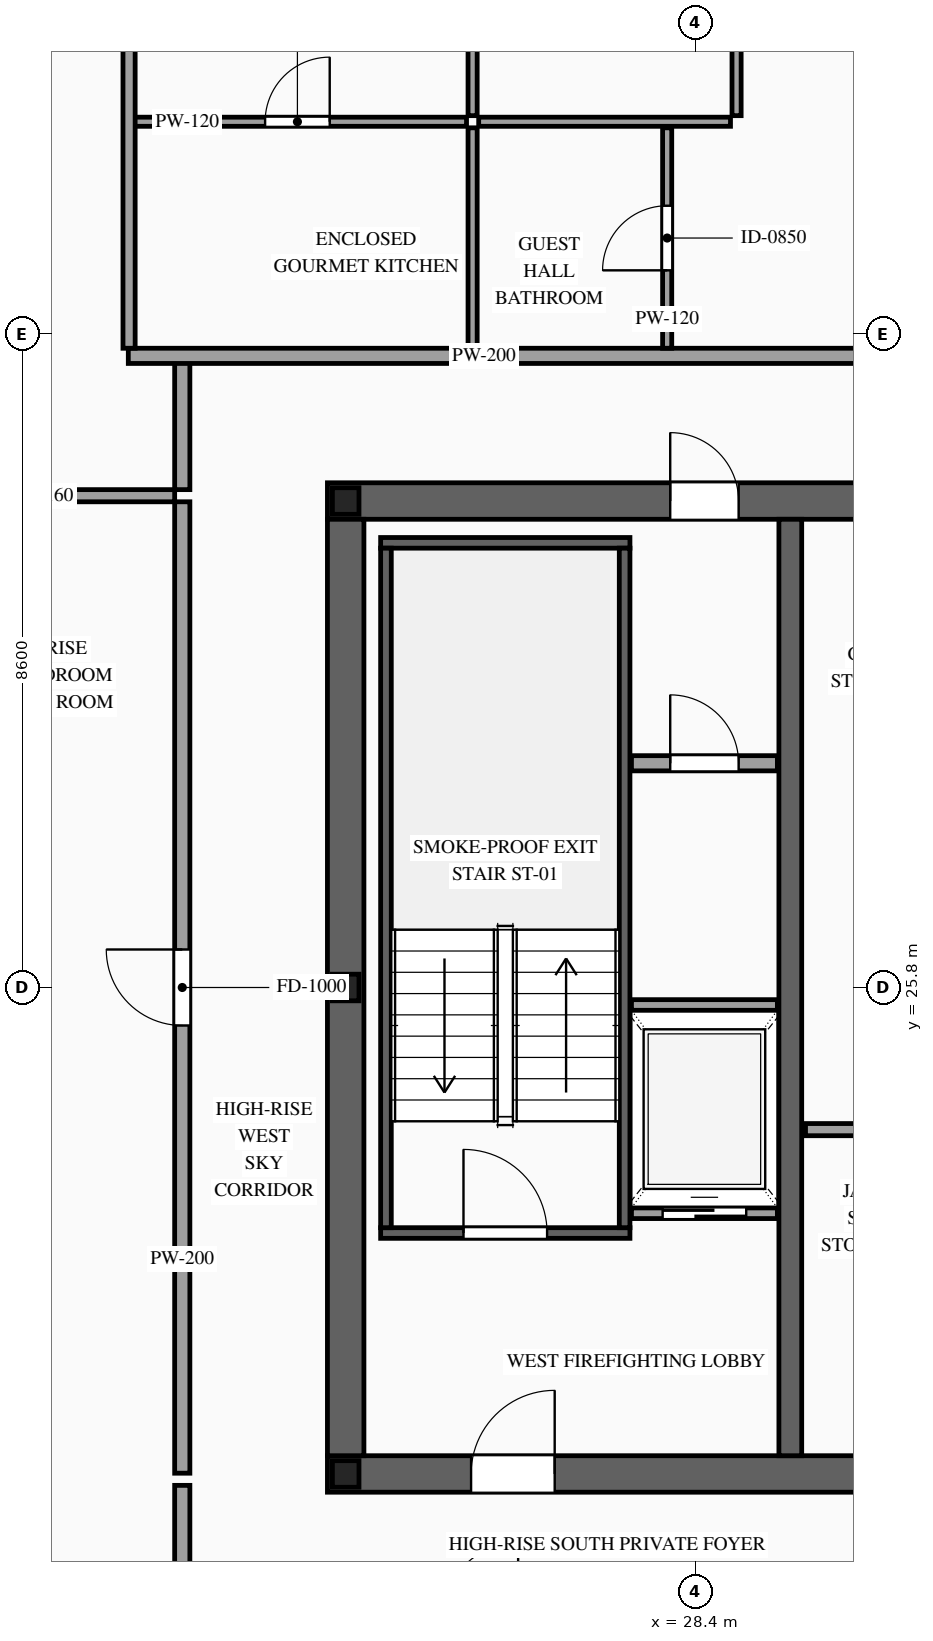
"""IFC4 building model, lengths in metres.
Left out: names, types, materials, properties, quantities, classifications, styles, units other than length and angle.
Written with IfcOpenShell. Run it as: python <this file> out.ifc"""

import sys

from ifc_helpers import new_model, si_unit, direction, frame, frame_2d, origin, origin_2d, place, context, subcontext, project, spatial, rectangle, i_section, extrude, source, transform, mapped, element, fill, save


model = new_model("IFC4")
c1 = context("Model", 3, precision=1e-05, world=origin(), true_north=direction((0.0, 1.0)))
c2 = subcontext(c1, "Body", "Model", "MODEL_VIEW")
j1 = project(units=[si_unit("LENGTHUNIT", "METRE"), si_unit("PLANEANGLEUNIT", "RADIAN")], contexts=[c1])
p1 = place(None, origin())
s1 = spatial("IfcSite", under=j1, at=p1, CompositionType="ELEMENT")
p2 = place(p1, origin())
s2 = spatial("IfcBuilding", under=s1, at=p2, CompositionType="ELEMENT")
p3 = place(p2, frame((0.0, 0.0, 285.6)))
s3 = spatial("IfcBuildingStorey", under=s2, at=p3, CompositionType="ELEMENT", Elevation=285.6)
p4 = place(p3, frame((23.56, 19.4, 0.0), z_axis=(0.0, 0.0, 1.0), x_axis=(1.0, 0.0, 0.0)))
e1 = element("IfcWall", 1, at=p4, inside=s3, PredefinedType="SHEAR", context=c2, shape_type="SweptSolid", body=[
    extrude(rectangle(XDim=26.88, YDim=0.48, at=frame_2d((13.44, 0.0))), origin(), (0.0, 0.0, 1.0), 3.5),
])
p5 = place(p4, frame((1.89, 0.0, 0.0)))
e2 = element("IfcOpeningElement", 2, at=p5, cuts=e1, PredefinedType="OPENING", context=c2, shape_type="SweptSolid", body=[
    extrude(rectangle(XDim=1.1, YDim=2.2, at=frame_2d((0.55, 1.1))), frame((0.0, 0.255, 0.0), z_axis=(0.0, -1.0, 0.0), x_axis=(1.0, 0.0, 0.0)), (0.0, 0.0, 1.0), 0.51),
])
p6 = place(p4, frame((9.79, 0.0, 0.0)))
e3 = element("IfcOpeningElement", 3, at=p6, cuts=e1, PredefinedType="OPENING", context=c2, shape_type="SweptSolid", body=[
    extrude(rectangle(XDim=1.1, YDim=2.2, at=frame_2d((0.55, 1.1))), frame((0.0, 0.255, 0.0), z_axis=(0.0, -1.0, 0.0), x_axis=(1.0, 0.0, 0.0)), (0.0, 0.0, 1.0), 0.51),
])
p7 = place(p4, frame((22.99, 0.0, 0.0)))
e4 = element("IfcOpeningElement", 4, at=p7, cuts=e1, PredefinedType="OPENING", context=c2, shape_type="SweptSolid", body=[
    extrude(rectangle(XDim=1.1, YDim=2.2, at=frame_2d((0.55, 1.1))), frame((0.0, 0.255, 0.0), z_axis=(0.0, -1.0, 0.0), x_axis=(1.0, 0.0, 0.0)), (0.0, 0.0, 1.0), 0.51),
])
p8 = place(p4, frame((19.61, 0.0, 0.0)))
e5 = element("IfcOpeningElement", 5, at=p8, cuts=e1, PredefinedType="OPENING", context=c2, shape_type="SweptSolid", body=[
    extrude(rectangle(XDim=0.9, YDim=2.15, at=frame_2d((0.45, 1.075))), frame((0.0, 0.255, 0.0), z_axis=(0.0, -1.0, 0.0), x_axis=(1.0, 0.0, 0.0)), (0.0, 0.0, 1.0), 0.51),
])
p9 = place(p4, frame((18.17, 0.0, 0.0)))
e6 = element("IfcOpeningElement", 6, at=p9, cuts=e1, PredefinedType="OPENING", context=c2, shape_type="SweptSolid", body=[
    extrude(rectangle(XDim=0.9, YDim=2.15, at=frame_2d((0.45, 1.075))), frame((0.0, 0.255, 0.0), z_axis=(0.0, -1.0, 0.0), x_axis=(1.0, 0.0, 0.0)), (0.0, 0.0, 1.0), 0.51),
])
p10 = place(p3, frame((23.56, 32.2, 0.0), z_axis=(0.0, 0.0, 1.0), x_axis=(1.0, 0.0, 0.0)))
e7 = element("IfcWall", 7, at=p10, inside=s3, PredefinedType="SHEAR", context=c2, shape_type="SweptSolid", body=[
    extrude(rectangle(XDim=26.88, YDim=0.48, at=frame_2d((13.44, 0.0))), origin(), (0.0, 0.0, 1.0), 3.5),
])
p11 = place(p10, frame((4.51, 0.0, 0.0)))
e8 = element("IfcOpeningElement", 8, at=p11, cuts=e7, PredefinedType="OPENING", context=c2, shape_type="SweptSolid", body=[
    extrude(rectangle(XDim=0.9, YDim=2.15, at=frame_2d((0.45, 1.075))), frame((0.0, 0.255, 0.0), z_axis=(0.0, -1.0, 0.0), x_axis=(1.0, 0.0, 0.0)), (0.0, 0.0, 1.0), 0.51),
])
p12 = place(p10, frame((9.79, 0.0, 0.0)))
e9 = element("IfcOpeningElement", 9, at=p12, cuts=e7, PredefinedType="OPENING", context=c2, shape_type="SweptSolid", body=[
    extrude(rectangle(XDim=1.1, YDim=2.2, at=frame_2d((0.55, 1.1))), frame((0.0, 0.255, 0.0), z_axis=(0.0, -1.0, 0.0), x_axis=(1.0, 0.0, 0.0)), (0.0, 0.0, 1.0), 0.51),
])
p13 = place(p10, frame((15.64, 0.0, 0.0)))
e10 = element("IfcOpeningElement", 10, at=p13, cuts=e7, PredefinedType="OPENING", context=c2, shape_type="SweptSolid", body=[
    extrude(rectangle(XDim=1.1, YDim=2.2, at=frame_2d((0.55, 1.1))), frame((0.0, 0.255, 0.0), z_axis=(0.0, -1.0, 0.0), x_axis=(1.0, 0.0, 0.0)), (0.0, 0.0, 1.0), 0.51),
])
p14 = place(p10, frame((18.74, 0.0, 0.0)))
e11 = element("IfcOpeningElement", 11, at=p14, cuts=e7, PredefinedType="OPENING", context=c2, shape_type="SweptSolid", body=[
    extrude(rectangle(XDim=1.1, YDim=2.2, at=frame_2d((0.55, 1.1))), frame((0.0, 0.255, 0.0), z_axis=(0.0, -1.0, 0.0), x_axis=(1.0, 0.0, 0.0)), (0.0, 0.0, 1.0), 0.51),
])
m1 = source(origin(), c2, "Body", "SweptSolid", [
    extrude(rectangle(XDim=12.32, YDim=0.48, at=frame_2d((6.16, 0.0))), origin(), (0.0, 0.0, 1.0), 3.5),
])
p15 = place(p3, frame((23.8, 19.64, 0.0), z_axis=(0.0, 0.0, 1.0), x_axis=(0.0, 1.0, 0.0)))
e12 = element("IfcWall", 12, at=p15, inside=s3, PredefinedType="SHEAR", context=c2, shape_type="MappedRepresentation", body=[
    mapped(m1, transform((0.0, 0.0, 0.0), scale=1.0)),
])
m2 = source(origin(), c2, "Body", "SweptSolid", [
    extrude(rectangle(XDim=12.32, YDim=0.3, at=frame_2d((6.16, 0.0))), origin(), (0.0, 0.0, 1.0), 3.5),
])
p16 = place(p3, frame((29.65, 19.64, 0.0), z_axis=(0.0, 0.0, 1.0), x_axis=(0.0, 1.0, 0.0)))
e13 = element("IfcWall", 13, at=p16, inside=s3, PredefinedType="SOLIDWALL", context=c2, shape_type="MappedRepresentation", body=[
    mapped(m2, transform((0.0, 0.0, 0.0), scale=1.0)),
])
m3 = source(origin(), c2, "Body", "SweptSolid", [
    extrude(i_section(OverallWidth=0.35, OverallDepth=0.35, WebThickness=0.012, FlangeThickness=0.019, at=origin_2d()), origin(), (0.0, 0.0, 1.0), 3.5),
])
for number, where, z_axis, x_axis in (
    (14, (23.8, 19.4, 0.0), (0.0, 0.0, 1.0), (1.0, 0.0, 0.0)),
    (15, (23.8, 25.8, 0.0), (0.0, 0.0, 1.0), (1.0, 0.0, 0.0)),
    (16, (23.8, 32.2, 0.0), (0.0, 0.0, 1.0), (1.0, 0.0, 0.0)),
):
    element("IfcColumn", number, at=place(p3, frame(where, z_axis=z_axis, x_axis=x_axis)), inside=s3, PredefinedType="COLUMN", context=c2, shape_type="MappedRepresentation", body=[
        mapped(m3, transform((0.0, 0.0, 0.0), scale=1.0)),
    ])
p17 = place(p3, frame((27.56, 22.83, 0.0), z_axis=(0.0, 0.0, 1.0), x_axis=(1.0, 0.0, 0.0)))
e17 = element("IfcWall", 17, at=p17, inside=s3, PredefinedType="SOLIDWALL", context=c2, shape_type="SweptSolid", body=[
    extrude(rectangle(XDim=1.92, YDim=0.14, at=frame_2d((0.96, 0.0))), origin(), (0.0, 0.0, 1.0), 3.28),
])
p18 = place(p17, frame((0.41, 0.0, 0.0)))
e18 = element("IfcOpeningElement", 18, at=p18, cuts=e17, PredefinedType="OPENING", context=c2, shape_type="SweptSolid", body=[
    extrude(rectangle(XDim=1.1, YDim=2.2, at=frame_2d((0.55, 1.1))), frame((0.0, 0.085, 0.0), z_axis=(0.0, -1.0, 0.0), x_axis=(1.0, 0.0, 0.0)), (0.0, 0.0, 1.0), 0.17),
])
m4 = source(origin(), c2, "Body", "SweptSolid", [
    extrude(rectangle(XDim=1.92, YDim=0.14, at=frame_2d((0.96, 0.0))), origin(), (0.0, 0.0, 1.0), 3.28),
])
p19 = place(p3, frame((27.56, 25.57, 0.0), z_axis=(0.0, 0.0, 1.0), x_axis=(1.0, 0.0, 0.0)))
e19 = element("IfcWall", 19, at=p19, inside=s3, PredefinedType="SOLIDWALL", context=c2, shape_type="MappedRepresentation", body=[
    mapped(m4, transform((0.0, 0.0, 0.0), scale=1.0)),
])
p20 = place(p3, frame((24.26, 22.57, 0.0), z_axis=(0.0, 0.0, 1.0), x_axis=(1.0, 0.0, 0.0)))
e20 = element("IfcWall", 20, at=p20, inside=s3, PredefinedType="SOLIDWALL", context=c2, shape_type="SweptSolid", body=[
    extrude(rectangle(XDim=3.28, YDim=0.14, at=frame_2d((1.64, 0.0))), origin(), (0.0, 0.0, 1.0), 3.28),
])
p21 = place(p20, frame((1.09, 0.0, 0.0)))
e21 = element("IfcOpeningElement", 21, at=p21, cuts=e20, PredefinedType="OPENING", context=c2, shape_type="SweptSolid", body=[
    extrude(rectangle(XDim=1.1, YDim=2.2, at=frame_2d((0.55, 1.1))), frame((0.0, 0.085, 0.0), z_axis=(0.0, -1.0, 0.0), x_axis=(1.0, 0.0, 0.0)), (0.0, 0.0, 1.0), 0.17),
])
m5 = source(origin(), c2, "Body", "SweptSolid", [
    extrude(rectangle(XDim=3.28, YDim=0.14, at=frame_2d((1.64, 0.0))), origin(), (0.0, 0.0, 1.0), 3.28),
])
p22 = place(p3, frame((24.26, 31.65, 0.0), z_axis=(0.0, 0.0, 1.0), x_axis=(1.0, 0.0, 0.0)))
e22 = element("IfcWall", 22, at=p22, inside=s3, PredefinedType="SOLIDWALL", context=c2, shape_type="MappedRepresentation", body=[
    mapped(m5, transform((0.0, 0.0, 0.0), scale=1.0)),
])
m6 = source(origin(), c2, "Body", "SweptSolid", [
    extrude(rectangle(XDim=8.94, YDim=0.14, at=frame_2d((4.47, 0.0))), origin(), (0.0, 0.0, 1.0), 3.28),
])
for number, where, z_axis, x_axis in (
    (23, (24.33, 22.64, 0.0), (0.0, 0.0, 1.0), (0.0, 1.0, 0.0)),
    (24, (27.47, 22.64, 0.0), (0.0, 0.0, 1.0), (0.0, 1.0, 0.0)),
):
    element("IfcWall", number, at=place(p3, frame(where, z_axis=z_axis, x_axis=x_axis)), inside=s3, PredefinedType="SOLIDWALL", context=c2, shape_type="MappedRepresentation", body=[
        mapped(m6, transform((0.0, 0.0, 0.0), scale=1.0)),
    ])
p23 = place(p3, frame((27.56, 28.75, 0.0), z_axis=(0.0, 0.0, 1.0), x_axis=(1.0, 0.0, 0.0)))
e25 = element("IfcWall", 25, at=p23, inside=s3, PredefinedType="PARTITIONING", context=c2, shape_type="SweptSolid", body=[
    extrude(rectangle(XDim=1.92, YDim=0.2, at=frame_2d((0.96, 0.0))), origin(), (0.0, 0.0, 1.0), 3.28),
])
p24 = place(p23, frame((0.51, 0.0, 0.0)))
e26 = element("IfcOpeningElement", 26, at=p24, cuts=e25, PredefinedType="OPENING", context=c2, shape_type="SweptSolid", body=[
    extrude(rectangle(XDim=0.9, YDim=2.15, at=frame_2d((0.45, 1.075))), frame((0.0, 0.115, 0.0), z_axis=(0.0, -1.0, 0.0), x_axis=(1.0, 0.0, 0.0)), (0.0, 0.0, 1.0), 0.23),
])
m7 = source(origin(), c2, "Body", "SweptSolid", [
    extrude(rectangle(XDim=2.47, YDim=0.16, at=frame_2d((1.235, 0.0))), origin(), (0.0, 0.0, 1.0), 3.28),
])
p25 = place(p3, frame((29.85, 23.93, 0.0), z_axis=(0.0, 0.0, 1.0), x_axis=(1.0, 0.0, 0.0)))
e27 = element("IfcWall", 27, at=p25, inside=s3, PredefinedType="PARTITIONING", context=c2, shape_type="MappedRepresentation", body=[
    mapped(m7, transform((0.0, 0.0, 0.0), scale=1.0)),
])
m8 = source(origin(), c2, "Body", "SweptSolid", [
    extrude(rectangle(XDim=1.7, YDim=0.2, at=frame_2d((0.85, 0.0))), origin(), (0.0, 0.0, 1.0), 3.28),
])
for number, where, z_axis, x_axis in (
    (28, (21.65, 32.35, 0.0), (0.0, 0.0, 1.0), (0.0, 1.0, 0.0)),
    (29, (21.65, 17.55, 0.0), (0.0, 0.0, 1.0), (0.0, 1.0, 0.0)),
):
    element("IfcWall", number, at=place(p3, frame(where, z_axis=z_axis, x_axis=x_axis)), inside=s3, PredefinedType="PARTITIONING", context=c2, shape_type="MappedRepresentation", body=[
        mapped(m8, transform((0.0, 0.0, 0.0), scale=1.0)),
    ])
p26 = place(p3, frame((20.94, 34.11, 0.0), z_axis=(0.0, 0.0, 1.0), x_axis=(1.0, 0.0, 0.0)))
e30 = element("IfcWall", 30, at=p26, inside=s3, PredefinedType="PARTITIONING", context=c2, shape_type="SweptSolid", body=[
    extrude(rectangle(XDim=16.622, YDim=0.2, at=frame_2d((8.311, 0.0))), origin(), (0.0, 0.0, 1.0), 3.28),
])
p27 = place(p26, frame((9.611, 0.0, 0.0)))
e31 = element("IfcOpeningElement", 31, at=p27, cuts=e30, PredefinedType="OPENING", context=c2, shape_type="SweptSolid", body=[
    extrude(rectangle(XDim=1.0, YDim=2.2, at=frame_2d((0.5, 1.1))), frame((0.0, 0.115, 0.0), z_axis=(0.0, -1.0, 0.0), x_axis=(1.0, 0.0, 0.0)), (0.0, 0.0, 1.0), 0.23),
])
p28 = place(p3, frame((20.94, 37.19, 0.0), z_axis=(0.0, 0.0, 1.0), x_axis=(1.0, 0.0, 0.0)))
e32 = element("IfcWall", 32, at=p28, inside=s3, PredefinedType="PARTITIONING", context=c2, shape_type="SweptSolid", body=[
    extrude(rectangle(XDim=4.45, YDim=0.12, at=frame_2d((2.225, 0.0))), origin(), (0.0, 0.0, 1.0), 3.28),
])
p29 = place(p28, frame((1.8, 0.0, 0.0)))
e33 = element("IfcOpeningElement", 33, at=p29, cuts=e32, PredefinedType="OPENING", context=c2, shape_type="SweptSolid", body=[
    extrude(rectangle(XDim=0.85, YDim=2.1, at=frame_2d((0.425, 1.05))), frame((0.0, 0.075, 0.0), z_axis=(0.0, -1.0, 0.0), x_axis=(1.0, 0.0, 0.0)), (0.0, 0.0, 1.0), 0.15),
])
m9 = source(origin(), c2, "Body", "SweptSolid", [
    extrude(rectangle(XDim=2.9, YDim=0.12, at=frame_2d((1.45, 0.0))), origin(), (0.0, 0.0, 1.0), 3.28),
])
p30 = place(p3, frame((25.47, 34.21, 0.0), z_axis=(0.0, 0.0, 1.0), x_axis=(0.0, 1.0, 0.0)))
e34 = element("IfcWall", 34, at=p30, inside=s3, PredefinedType="PARTITIONING", context=c2, shape_type="MappedRepresentation", body=[
    mapped(m9, transform((0.0, 0.0, 0.0), scale=1.0)),
])
p31 = place(p3, frame((28.03, 34.21, 0.0), z_axis=(0.0, 0.0, 1.0), x_axis=(0.0, 1.0, 0.0)))
e35 = element("IfcWall", 35, at=p31, inside=s3, PredefinedType="PARTITIONING", context=c2, shape_type="SweptSolid", body=[
    extrude(rectangle(XDim=2.9, YDim=0.12, at=frame_2d((1.45, 0.0))), origin(), (0.0, 0.0, 1.0), 3.28),
])
p32 = place(p31, frame((1.025, 0.0, 0.0)))
e36 = element("IfcOpeningElement", 36, at=p32, cuts=e35, PredefinedType="OPENING", context=c2, shape_type="SweptSolid", body=[
    extrude(rectangle(XDim=0.85, YDim=2.1, at=frame_2d((0.425, 1.05))), frame((0.0, 0.075, 0.0), z_axis=(0.0, -1.0, 0.0), x_axis=(1.0, 0.0, 0.0)), (0.0, 0.0, 1.0), 0.15),
])
p33 = place(p3, frame((25.47, 37.27, 0.0), z_axis=(0.0, 0.0, 1.0), x_axis=(0.0, 1.0, 0.0)))
e37 = element("IfcWall", 37, at=p33, inside=s3, PredefinedType="PARTITIONING", context=c2, shape_type="SweptSolid", body=[
    extrude(rectangle(XDim=7.48, YDim=0.12, at=frame_2d((3.74, 0.0))), origin(), (0.0, 0.0, 1.0), 3.28),
])
p34 = place(p33, frame((3.29, 0.0, 0.0)))
e38 = element("IfcOpeningElement", 38, at=p34, cuts=e37, PredefinedType="OPENING", context=c2, shape_type="SweptSolid", body=[
    extrude(rectangle(XDim=0.9, YDim=2.15, at=frame_2d((0.45, 1.075))), frame((0.0, 0.075, 0.0), z_axis=(0.0, -1.0, 0.0), x_axis=(1.0, 0.0, 0.0)), (0.0, 0.0, 1.0), 0.15),
])
m10 = source(origin(), c2, "Body", "SweptSolid", [
    extrude(rectangle(XDim=3.313, YDim=0.12, at=frame_2d((1.656, 0.0))), origin(), (0.0, 0.0, 1.0), 3.28),
])
p35 = place(p3, frame((25.55, 37.19, 0.0), z_axis=(0.0, 0.0, 1.0), x_axis=(1.0, 0.0, 0.0)))
e39 = element("IfcWall", 39, at=p35, inside=s3, PredefinedType="PARTITIONING", context=c2, shape_type="MappedRepresentation", body=[
    mapped(m10, transform((0.0, 0.0, 0.0), scale=1.0)),
])
p36 = place(p3, frame((28.943, 37.27, 0.0), z_axis=(0.0, 0.0, 1.0), x_axis=(0.0, 1.0, 0.0)))
e40 = element("IfcWall", 40, at=p36, inside=s3, PredefinedType="PARTITIONING", context=c2, shape_type="SweptSolid", body=[
    extrude(rectangle(XDim=7.48, YDim=0.12, at=frame_2d((3.74, 0.0))), origin(), (0.0, 0.0, 1.0), 3.28),
])
p37 = place(p36, frame((3.29, 0.0, 0.0)))
e41 = element("IfcOpeningElement", 41, at=p37, cuts=e40, PredefinedType="OPENING", context=c2, shape_type="SweptSolid", body=[
    extrude(rectangle(XDim=0.9, YDim=2.15, at=frame_2d((0.45, 1.075))), frame((0.0, 0.075, 0.0), z_axis=(0.0, -1.0, 0.0), x_axis=(1.0, 0.0, 0.0)), (0.0, 0.0, 1.0), 0.15),
])
m11 = source(origin(), c2, "Body", "SweptSolid", [
    extrude(rectangle(XDim=10.39, YDim=0.16, at=frame_2d((5.195, 0.0))), origin(), (0.0, 0.0, 1.0), 3.28),
])
p38 = place(p3, frame((20.95, 34.21, 0.0), z_axis=(0.0, 0.0, 1.0), x_axis=(0.0, 1.0, 0.0)))
e42 = element("IfcWall", 42, at=p38, inside=s3, PredefinedType="PARTITIONING", context=c2, shape_type="MappedRepresentation", body=[
    mapped(m11, transform((0.0, 0.0, 0.0), scale=1.0)),
])
p39 = place(p3, frame((21.65, 19.41, 0.0), z_axis=(0.0, 0.0, 1.0), x_axis=(0.0, 1.0, 0.0)))
e43 = element("IfcWall", 43, at=p39, inside=s3, PredefinedType="PARTITIONING", context=c2, shape_type="SweptSolid", body=[
    extrude(rectangle(XDim=12.78, YDim=0.2, at=frame_2d((6.39, 0.0))), origin(), (0.0, 0.0, 1.0), 3.28),
])
p40 = place(p39, frame((5.89, 0.0, 0.0)))
e44 = element("IfcOpeningElement", 44, at=p40, cuts=e43, PredefinedType="OPENING", context=c2, shape_type="SweptSolid", body=[
    extrude(rectangle(XDim=1.0, YDim=2.2, at=frame_2d((0.5, 1.1))), frame((0.0, 0.115, 0.0), z_axis=(0.0, -1.0, 0.0), x_axis=(1.0, 0.0, 0.0)), (0.0, 0.0, 1.0), 0.23),
])
m12 = source(origin(), c2, "Body", "SweptSolid", [
    extrude(rectangle(XDim=3.5, YDim=0.16, at=frame_2d((1.75, 0.0))), origin(), (0.0, 0.0, 1.0), 2.825),
])
p41 = place(p3, frame((18.05, 32.27, 0.0), z_axis=(0.0, 0.0, 1.0), x_axis=(1.0, 0.0, 0.0)))
e45 = element("IfcWall", 45, at=p41, inside=s3, PredefinedType="PARTITIONING", context=c2, shape_type="MappedRepresentation", body=[
    mapped(m12, transform((0.0, 0.0, 0.0), scale=1.0)),
])
m13 = source(origin(), c2, "Body", "SweptSolid", [
    extrude(rectangle(XDim=1.1, YDim=2.2, at=frame_2d((0.55, 1.1))), frame((0.0, 0.025, 0.0), z_axis=(0.0, -1.0, 0.0), x_axis=(1.0, 0.0, 0.0)), (0.0, 0.0, 1.0), 0.05),
])
p42 = place(p18, origin())
e46 = element("IfcDoor", 46, at=p42, inside=s3, OperationType="SLIDING_TO_LEFT", PredefinedType="DOOR", context=c2, shape_type="MappedRepresentation", body=[
    mapped(m13, transform((0.0, 0.0, 0.0), scale=1.0)),
])
fill(e18, e46)
m14 = source(origin(), c2, "Body", "SweptSolid", [
    extrude(rectangle(XDim=1.1, YDim=2.2, at=frame_2d((0.55, 1.1))), frame((0.0, 0.025, 0.0), z_axis=(0.0, -1.0, 0.0), x_axis=(1.0, 0.0, 0.0)), (0.0, 0.0, 1.0), 0.05),
])
p43 = place(p21, origin())
e47 = element("IfcDoor", 47, at=p43, inside=s3, OperationType="SINGLE_SWING_LEFT", PredefinedType="DOOR", context=c2, shape_type="MappedRepresentation", body=[
    mapped(m14, transform((0.0, 0.0, 0.0), scale=1.0)),
])
fill(e21, e47)
p44 = place(p5, origin())
e48 = element("IfcDoor", 48, at=p44, inside=s3, OperationType="SINGLE_SWING_RIGHT", PredefinedType="DOOR", context=c2, shape_type="MappedRepresentation", body=[
    mapped(m14, transform((0.0, 0.0, 0.0), scale=1.0)),
])
fill(e2, e48)
m15 = source(origin(), c2, "Body", "SweptSolid", [
    extrude(rectangle(XDim=0.9, YDim=2.15, at=frame_2d((0.45, 1.075))), frame((0.0, 0.025, 0.0), z_axis=(0.0, -1.0, 0.0), x_axis=(1.0, 0.0, 0.0)), (0.0, 0.0, 1.0), 0.05),
])
p45 = place(p11, origin())
e49 = element("IfcDoor", 49, at=p45, inside=s3, OperationType="SINGLE_SWING_LEFT", PredefinedType="DOOR", context=c2, shape_type="MappedRepresentation", body=[
    mapped(m15, transform((0.0, 0.0, 0.0), scale=1.0)),
])
fill(e8, e49)
p46 = place(p24, origin())
e50 = element("IfcDoor", 50, at=p46, inside=s3, OperationType="SINGLE_SWING_LEFT", PredefinedType="DOOR", context=c2, shape_type="MappedRepresentation", body=[
    mapped(m15, transform((0.0, 0.0, 0.0), scale=1.0)),
])
fill(e26, e50)
m16 = source(origin(), c2, "Body", "SweptSolid", [
    extrude(rectangle(XDim=0.85, YDim=2.1, at=frame_2d((0.425, 1.05))), frame((0.0, 0.025, 0.0), z_axis=(0.0, -1.0, 0.0), x_axis=(1.0, 0.0, 0.0)), (0.0, 0.0, 1.0), 0.05),
])
p47 = place(p29, origin())
e51 = element("IfcDoor", 51, at=p47, inside=s3, OperationType="SINGLE_SWING_RIGHT", PredefinedType="DOOR", context=c2, shape_type="MappedRepresentation", body=[
    mapped(m16, transform((0.0, 0.0, 0.0), scale=1.0)),
])
fill(e33, e51)
p48 = place(p32, origin())
e52 = element("IfcDoor", 52, at=p48, inside=s3, OperationType="SINGLE_SWING_LEFT", PredefinedType="DOOR", context=c2, shape_type="MappedRepresentation", body=[
    mapped(m16, transform((0.0, 0.0, 0.0), scale=1.0)),
])
fill(e36, e52)
m17 = source(origin(), c2, "Body", "SweptSolid", [
    extrude(rectangle(XDim=1.0, YDim=2.2, at=frame_2d((0.5, 1.1))), frame((0.0, 0.025, 0.0), z_axis=(0.0, -1.0, 0.0), x_axis=(1.0, 0.0, 0.0)), (0.0, 0.0, 1.0), 0.05),
])
p49 = place(p40, origin())
e53 = element("IfcDoor", 53, at=p49, inside=s3, OperationType="SINGLE_SWING_RIGHT", PredefinedType="DOOR", context=c2, shape_type="MappedRepresentation", body=[
    mapped(m17, transform((0.0, 0.0, 0.0), scale=1.0)),
])
fill(e44, e53)
save(model, sys.argv[1])
